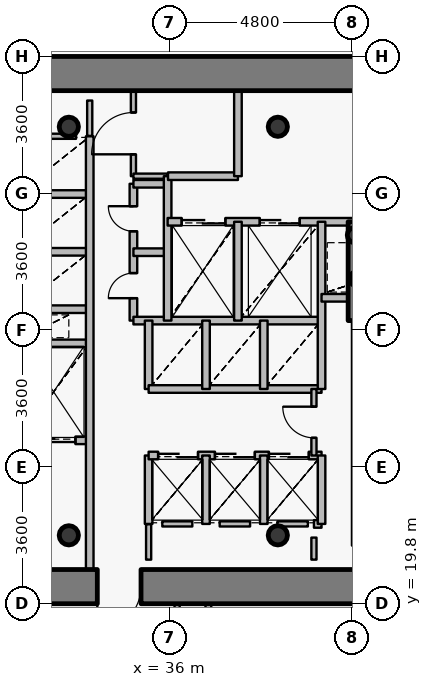
"""IFC4 building model, lengths in metres.
Left out: names, types, materials, properties, quantities, classifications, styles, units other than length and angle.
Written with IfcOpenShell. Run it as: python <this file> out.ifc"""

import sys

from ifc_helpers import new_model, si_unit, direction, frame, frame_2d, origin, origin_2d, place, context, subcontext, project, spatial, rectangle, hollow_circle, extrude, source, transform, mapped, element, fill, save


model = new_model("IFC4")
c1 = context("Model", 3, precision=1e-05, world=origin(), true_north=direction((0.0, 1.0)))
c2 = subcontext(c1, "Body", "Model", "MODEL_VIEW")
j1 = project(units=[si_unit("LENGTHUNIT", "METRE"), si_unit("PLANEANGLEUNIT", "RADIAN")], contexts=[c1])
p1 = place(None, origin())
s1 = spatial("IfcSite", under=j1, at=p1, CompositionType="ELEMENT")
p2 = place(p1, origin())
s2 = spatial("IfcBuilding", under=s1, at=p2, CompositionType="ELEMENT")
p3 = place(p2, frame((0.0, 0.0, 40.8)))
s3 = spatial("IfcBuildingStorey", under=s2, at=p3, CompositionType="ELEMENT", Elevation=40.8)
for number, where, z_axis, x_axis in (
    (1, (33.35, 21.6, 0.0), (0.0, 0.0, 1.0), (1.0, 0.0, 0.0)),
    (2, (38.85, 21.6, 0.0), (0.0, 0.0, 1.0), (1.0, 0.0, 0.0)),
    (3, (38.85, 32.35, 0.0), (0.0, 0.0, 1.0), (1.0, 0.0, 0.0)),
    (4, (33.35, 32.35, 0.0), (0.0, 0.0, 1.0), (1.0, 0.0, 0.0)),
):
    element("IfcColumn", number, at=place(p3, frame(where, z_axis=z_axis, x_axis=x_axis)), inside=s3, PredefinedType="COLUMN", context=c2, shape_type="SweptSolid", body=[
        extrude(hollow_circle(Radius=0.254, WallThickness=0.02, at=origin_2d()), origin(), (0.0, 0.0, 1.0), 4.2),
    ])
for number, where, z_axis, x_axis in (
    (5, (40.95, 28.35, 0.0), (0.0, 0.0, 1.0), (1.0, 0.0, 0.0)),
    (6, (40.88, 29.5, 0.0), (0.0, 0.0, 1.0), (1.0, 0.0, 0.0)),
):
    element("IfcColumn", number, at=place(p3, frame(where, z_axis=z_axis, x_axis=x_axis)), inside=s3, PredefinedType="COLUMN", context=c2, shape_type="SweptSolid", body=[
        extrude(hollow_circle(Radius=0.203, WallThickness=0.016, at=origin_2d()), origin(), (0.0, 0.0, 1.0), 4.2),
    ])
p4 = place(p3, frame((26.75, 33.75, 0.0), z_axis=(0.0, 0.0, 1.0), x_axis=(1.0, 0.0, 0.0)))
e7 = element("IfcWall", 7, at=p4, inside=s3, PredefinedType="SHEAR", context=c2, shape_type="SweptSolid", body=[
    extrude(rectangle(XDim=18.5, YDim=0.9, at=frame_2d((9.25, 0.0))), origin(), (0.0, 0.0, 1.0), 3.4),
])
p5 = place(p3, frame((45.25, 20.25, 0.0), z_axis=(0.0, 0.0, 1.0), x_axis=(-1.0, 0.0, 0.0)))
e8 = element("IfcWall", 8, at=p5, inside=s3, PredefinedType="SHEAR", context=c2, shape_type="SweptSolid", body=[
    extrude(rectangle(XDim=18.5, YDim=0.9, at=frame_2d((9.25, 0.0))), origin(), (0.0, 0.0, 1.0), 3.4),
])
p6 = place(p5, frame((10.0, 0.0, 0.0)))
e9 = element("IfcOpeningElement", 9, at=p6, cuts=e8, PredefinedType="OPENING", context=c2, shape_type="SweptSolid", body=[
    extrude(rectangle(XDim=1.15, YDim=2.15, at=origin_2d()), frame((0.575, 0.46, 1.075), z_axis=(0.0, -1.0, 0.0), x_axis=(1.0, 0.0, 0.0)), (0.0, 0.0, 1.0), 0.92),
])
p7 = place(p3, frame((40.9, 27.25, 0.0), z_axis=(0.0, 0.0, 1.0), x_axis=(0.0, 1.0, 0.0)))
e10 = element("IfcWall", 10, at=p7, inside=s3, PredefinedType="SHEAR", context=c2, shape_type="SweptSolid", body=[
    extrude(rectangle(XDim=2.6, YDim=0.4, at=frame_2d((1.3, 0.0))), origin(), (0.0, 0.0, 1.0), 3.55),
])
p8 = place(p3, frame((32.0, 24.1, 0.0), z_axis=(0.0, 0.0, 1.0), x_axis=(1.0, 0.0, 0.0)))
e11 = element("IfcWall", 11, at=p8, inside=s3, PredefinedType="PARTITIONING", context=c2, shape_type="SweptSolid", body=[
    extrude(rectangle(XDim=1.9, YDim=0.2, at=frame_2d((0.95, 0.0))), origin(), (0.0, 0.0, 1.0), 3.535),
])
p9 = place(p8, frame((0.375, 0.0, 0.0)))
e12 = element("IfcOpeningElement", 12, at=p9, cuts=e11, PredefinedType="OPENING", context=c2, shape_type="SweptSolid", body=[
    extrude(rectangle(XDim=1.15, YDim=2.15, at=origin_2d()), frame((0.575, 0.11, 1.075), z_axis=(0.0, -1.0, 0.0), x_axis=(1.0, 0.0, 0.0)), (0.0, 0.0, 1.0), 0.22),
])
for number, where, z_axis, x_axis in (
    (13, (32.0, 26.65, 0.0), (0.0, 0.0, 1.0), (1.0, 0.0, 0.0)),
    (14, (32.0, 27.55, 0.0), (0.0, 0.0, 1.0), (1.0, 0.0, 0.0)),
    (15, (32.0, 29.06, 0.0), (0.0, 0.0, 1.0), (1.0, 0.0, 0.0)),
    (16, (32.0, 30.58, 0.0), (0.0, 0.0, 1.0), (1.0, 0.0, 0.0)),
):
    element("IfcWall", number, at=place(p3, frame(where, z_axis=z_axis, x_axis=x_axis)), inside=s3, PredefinedType="PARTITIONING", context=c2, shape_type="SweptSolid", body=[
        extrude(rectangle(XDim=1.9, YDim=0.2, at=frame_2d((0.95, 0.0))), origin(), (0.0, 0.0, 1.0), 3.535),
    ])
p10 = place(p3, frame((33.9, 20.7, 0.0), z_axis=(0.0, 0.0, 1.0), x_axis=(0.0, 1.0, 0.0)))
e17 = element("IfcWall", 17, at=p10, inside=s3, PredefinedType="PARTITIONING", context=c2, shape_type="SweptSolid", body=[
    extrude(rectangle(XDim=11.4, YDim=0.2, at=frame_2d((5.7, 0.0))), origin(), (0.0, 0.0, 1.0), 3.535),
])
p11 = place(p3, frame((35.05, 27.25, 0.0), z_axis=(0.0, 0.0, 1.0), x_axis=(0.0, 1.0, 0.0)))
e18 = element("IfcWall", 18, at=p11, inside=s3, PredefinedType="PARTITIONING", context=c2, shape_type="SweptSolid", body=[
    extrude(rectangle(XDim=3.6, YDim=0.2, at=frame_2d((1.8, 0.0))), origin(), (0.0, 0.0, 1.0), 3.95),
])
p12 = place(p11, frame((0.59, 0.0, 0.0)))
e19 = element("IfcOpeningElement", 19, at=p12, cuts=e18, PredefinedType="OPENING", context=c2, shape_type="SweptSolid", body=[
    extrude(rectangle(XDim=0.66, YDim=2.05, at=origin_2d()), frame((0.33, 0.11, 1.025), z_axis=(0.0, -1.0, 0.0), x_axis=(1.0, 0.0, 0.0)), (0.0, 0.0, 1.0), 0.22),
])
p13 = place(p11, frame((2.35, 0.0, 0.0)))
e20 = element("IfcOpeningElement", 20, at=p13, cuts=e18, PredefinedType="OPENING", context=c2, shape_type="SweptSolid", body=[
    extrude(rectangle(XDim=0.66, YDim=2.05, at=origin_2d()), frame((0.33, 0.11, 1.025), z_axis=(0.0, -1.0, 0.0), x_axis=(1.0, 0.0, 0.0)), (0.0, 0.0, 1.0), 0.22),
])
p14 = place(p3, frame((35.05, 27.25, 0.0), z_axis=(0.0, 0.0, 1.0), x_axis=(1.0, 0.0, 0.0)))
e21 = element("IfcWall", 21, at=p14, inside=s3, PredefinedType="PARTITIONING", context=c2, shape_type="SweptSolid", body=[
    extrude(rectangle(XDim=4.95, YDim=0.2, at=frame_2d((2.475, 0.0))), origin(), (0.0, 0.0, 1.0), 3.535),
])
for number, where, z_axis, x_axis in (
    (22, (35.05, 29.05, 0.0), (0.0, 0.0, 1.0), (1.0, 0.0, 0.0)),
    (23, (35.05, 30.85, 0.0), (0.0, 0.0, 1.0), (1.0, 0.0, 0.0)),
):
    element("IfcWall", number, at=place(p3, frame(where, z_axis=z_axis, x_axis=x_axis)), inside=s3, PredefinedType="PARTITIONING", context=c2, shape_type="SweptSolid", body=[
        extrude(rectangle(XDim=0.9, YDim=0.2, at=frame_2d((0.45, 0.0))), origin(), (0.0, 0.0, 1.0), 3.95),
    ])
p15 = place(p3, frame((35.05, 31.05, 0.0), z_axis=(0.0, 0.0, 1.0), x_axis=(0.0, 1.0, 0.0)))
e24 = element("IfcWall", 24, at=p15, inside=s3, PredefinedType="PARTITIONING", context=c2, shape_type="SweptSolid", body=[
    extrude(rectangle(XDim=2.25, YDim=0.135, at=frame_2d((1.125, 0.0))), origin(), (0.0, 0.0, 1.0), 3.535),
])
p16 = place(p15, frame((0.575, 0.0, 0.0)))
e25 = element("IfcOpeningElement", 25, at=p16, cuts=e24, PredefinedType="OPENING", context=c2, shape_type="SweptSolid", body=[
    extrude(rectangle(XDim=1.1, YDim=2.15, at=origin_2d()), frame((0.55, 0.078, 1.075), z_axis=(0.0, -1.0, 0.0), x_axis=(1.0, 0.0, 0.0)), (0.0, 0.0, 1.0), 0.155),
])
p17 = place(p3, frame((35.05, 31.05, 0.0), z_axis=(0.0, 0.0, 1.0), x_axis=(1.0, 0.0, 0.0)))
e26 = element("IfcWall", 26, at=p17, inside=s3, PredefinedType="PARTITIONING", context=c2, shape_type="SweptSolid", body=[
    extrude(rectangle(XDim=0.9, YDim=0.135, at=frame_2d((0.45, 0.0))), origin(), (0.0, 0.0, 1.0), 3.95),
])
p18 = place(p3, frame((35.45, 21.9, 0.0), z_axis=(0.0, 0.0, 1.0), x_axis=(0.0, 1.0, 0.0)))
e27 = element("IfcWall", 27, at=p18, inside=s3, PredefinedType="PARTITIONING", context=c2, shape_type="SweptSolid", body=[
    extrude(rectangle(XDim=1.8, YDim=0.2, at=frame_2d((0.9, 0.0))), origin(), (0.0, 0.0, 1.0), 3.95),
])
p19 = place(p3, frame((35.45, 23.7, 0.0), z_axis=(0.0, 0.0, 1.0), x_axis=(1.0, 0.0, 0.0)))
e28 = element("IfcWall", 28, at=p19, inside=s3, PredefinedType="PARTITIONING", context=c2, shape_type="SweptSolid", body=[
    extrude(rectangle(XDim=4.55, YDim=0.2, at=frame_2d((2.275, 0.0))), origin(), (0.0, 0.0, 1.0), 3.535),
])
p20 = place(p19, frame((0.25, 0.0, 0.0)))
e29 = element("IfcOpeningElement", 29, at=p20, cuts=e28, PredefinedType="OPENING", context=c2, shape_type="SweptSolid", body=[
    extrude(rectangle(XDim=1.05, YDim=2.15, at=origin_2d()), frame((0.525, 0.11, 1.075), z_axis=(0.0, -1.0, 0.0), x_axis=(1.0, 0.0, 0.0)), (0.0, 0.0, 1.0), 0.22),
])
p21 = place(p19, frame((1.745, 0.0, 0.0)))
e30 = element("IfcOpeningElement", 30, at=p21, cuts=e28, PredefinedType="OPENING", context=c2, shape_type="SweptSolid", body=[
    extrude(rectangle(XDim=1.05, YDim=2.15, at=origin_2d()), frame((0.525, 0.11, 1.075), z_axis=(0.0, -1.0, 0.0), x_axis=(1.0, 0.0, 0.0)), (0.0, 0.0, 1.0), 0.22),
])
p22 = place(p19, frame((3.165, 0.0, 0.0)))
e31 = element("IfcOpeningElement", 31, at=p22, cuts=e28, PredefinedType="OPENING", context=c2, shape_type="SweptSolid", body=[
    extrude(rectangle(XDim=1.05, YDim=2.15, at=origin_2d()), frame((0.525, 0.11, 1.075), z_axis=(0.0, -1.0, 0.0), x_axis=(1.0, 0.0, 0.0)), (0.0, 0.0, 1.0), 0.22),
])
p23 = place(p3, frame((35.45, 25.45, 0.0), z_axis=(0.0, 0.0, 1.0), x_axis=(0.0, 1.0, 0.0)))
e32 = element("IfcWall", 32, at=p23, inside=s3, PredefinedType="PARTITIONING", context=c2, shape_type="SweptSolid", body=[
    extrude(rectangle(XDim=1.8, YDim=0.2, at=frame_2d((0.9, 0.0))), origin(), (0.0, 0.0, 1.0), 3.95),
])
p24 = place(p3, frame((35.45, 25.45, 0.0), z_axis=(0.0, 0.0, 1.0), x_axis=(1.0, 0.0, 0.0)))
e33 = element("IfcWall", 33, at=p24, inside=s3, PredefinedType="PARTITIONING", context=c2, shape_type="SweptSolid", body=[
    extrude(rectangle(XDim=4.55, YDim=0.2, at=frame_2d((2.275, 0.0))), origin(), (0.0, 0.0, 1.0), 3.535),
])
p25 = place(p3, frame((35.95, 27.25, 0.0), z_axis=(0.0, 0.0, 1.0), x_axis=(0.0, 1.0, 0.0)))
e34 = element("IfcWall", 34, at=p25, inside=s3, PredefinedType="PARTITIONING", context=c2, shape_type="SweptSolid", body=[
    extrude(rectangle(XDim=3.8, YDim=0.2, at=frame_2d((1.9, 0.0))), origin(), (0.0, 0.0, 1.0), 3.95),
])
p26 = place(p3, frame((35.95, 29.85, 0.0), z_axis=(0.0, 0.0, 1.0), x_axis=(1.0, 0.0, 0.0)))
e35 = element("IfcWall", 35, at=p26, inside=s3, PredefinedType="PARTITIONING", context=c2, shape_type="SweptSolid", body=[
    extrude(rectangle(XDim=8.49, YDim=0.2, at=frame_2d((4.245, 0.0))), origin(), (0.0, 0.0, 1.0), 3.535),
])
p27 = place(p26, frame((6.1, 0.0, 0.0)))
e36 = element("IfcOpeningElement", 36, at=p27, cuts=e35, PredefinedType="OPENING", context=c2, shape_type="SweptSolid", body=[
    extrude(rectangle(XDim=1.2, YDim=2.15, at=origin_2d()), frame((0.6, 0.11, 1.075), z_axis=(0.0, -1.0, 0.0), x_axis=(1.0, 0.0, 0.0)), (0.0, 0.0, 1.0), 0.22),
])
p28 = place(p26, frame((0.37, 0.0, 0.0)))
e37 = element("IfcOpeningElement", 37, at=p28, cuts=e35, PredefinedType="OPENING", context=c2, shape_type="SweptSolid", body=[
    extrude(rectangle(XDim=1.15, YDim=2.15, at=origin_2d()), frame((0.575, 0.11, 1.075), z_axis=(0.0, -1.0, 0.0), x_axis=(1.0, 0.0, 0.0)), (0.0, 0.0, 1.0), 0.22),
])
p29 = place(p26, frame((2.425, 0.0, 0.0)))
e38 = element("IfcOpeningElement", 38, at=p29, cuts=e35, PredefinedType="OPENING", context=c2, shape_type="SweptSolid", body=[
    extrude(rectangle(XDim=1.05, YDim=2.15, at=origin_2d()), frame((0.525, 0.11, 1.075), z_axis=(0.0, -1.0, 0.0), x_axis=(1.0, 0.0, 0.0)), (0.0, 0.0, 1.0), 0.22),
])
p30 = place(p3, frame((35.96, 31.05, 0.0), z_axis=(0.0, 0.0, 1.0), x_axis=(1.0, 0.0, 0.0)))
e39 = element("IfcWall", 39, at=p30, inside=s3, PredefinedType="PARTITIONING", context=c2, shape_type="SweptSolid", body=[
    extrude(rectangle(XDim=1.84, YDim=0.2, at=frame_2d((0.92, 0.0))), origin(), (0.0, 0.0, 1.0), 3.95),
])
p31 = place(p3, frame((36.2, 17.9, 0.0), z_axis=(0.0, 0.0, 1.0), x_axis=(0.0, 1.0, 0.0)))
e40 = element("IfcWall", 40, at=p31, inside=s3, PredefinedType="PARTITIONING", context=c2, shape_type="SweptSolid", body=[
    extrude(rectangle(XDim=1.9, YDim=0.135, at=frame_2d((0.95, 0.0))), origin(), (0.0, 0.0, 1.0), 3.285),
])
for number, where, z_axis, x_axis in (
    (41, (36.96, 21.9, 0.0), (0.0, 0.0, 1.0), (0.0, 1.0, 0.0)),
    (42, (36.96, 25.45, 0.0), (0.0, 0.0, 1.0), (0.0, 1.0, 0.0)),
):
    element("IfcWall", number, at=place(p3, frame(where, z_axis=z_axis, x_axis=x_axis)), inside=s3, PredefinedType="PARTITIONING", context=c2, shape_type="SweptSolid", body=[
        extrude(rectangle(XDim=1.8, YDim=0.2, at=frame_2d((0.9, 0.0))), origin(), (0.0, 0.0, 1.0), 3.95),
    ])
p32 = place(p3, frame((37.012, 19.8, 0.0), z_axis=(0.0, 0.0, 1.0), x_axis=(0.139168038406, -0.990268780224, 0.0)))
e43 = element("IfcWall", 43, at=p32, inside=s3, PredefinedType="PARTITIONING", context=c2, shape_type="SweptSolid", body=[
    extrude(rectangle(XDim=17.067, YDim=0.15, at=frame_2d((8.534, 0.0))), origin(), (0.0, 0.0, 1.0), 3.335),
])
p33 = place(p3, frame((37.8, 27.25, 0.0), z_axis=(0.0, 0.0, 1.0), x_axis=(0.0, 1.0, 0.0)))
e44 = element("IfcWall", 44, at=p33, inside=s3, PredefinedType="PARTITIONING", context=c2, shape_type="SweptSolid", body=[
    extrude(rectangle(XDim=2.6, YDim=0.2, at=frame_2d((1.3, 0.0))), origin(), (0.0, 0.0, 1.0), 3.95),
])
p34 = place(p3, frame((37.8, 31.05, 0.0), z_axis=(0.0, 0.0, 1.0), x_axis=(0.0, 1.0, 0.0)))
e45 = element("IfcWall", 45, at=p34, inside=s3, PredefinedType="PARTITIONING", context=c2, shape_type="SweptSolid", body=[
    extrude(rectangle(XDim=2.25, YDim=0.2, at=frame_2d((1.125, 0.0))), origin(), (0.0, 0.0, 1.0), 3.535),
])
for number, where, z_axis, x_axis in (
    (46, (38.48, 21.9, 0.0), (0.0, 0.0, 1.0), (0.0, 1.0, 0.0)),
    (47, (38.48, 25.45, 0.0), (0.0, 0.0, 1.0), (0.0, 1.0, 0.0)),
):
    element("IfcWall", number, at=place(p3, frame(where, z_axis=z_axis, x_axis=x_axis)), inside=s3, PredefinedType="PARTITIONING", context=c2, shape_type="SweptSolid", body=[
        extrude(rectangle(XDim=1.8, YDim=0.2, at=frame_2d((0.9, 0.0))), origin(), (0.0, 0.0, 1.0), 3.95),
    ])
p35 = place(p3, frame((39.8, 21.9, 0.0), z_axis=(0.0, 0.0, 1.0), x_axis=(1.0, 0.0, 0.0)))
e48 = element("IfcWall", 48, at=p35, inside=s3, PredefinedType="PARTITIONING", context=c2, shape_type="SweptSolid", body=[
    extrude(rectangle(XDim=0.2, YDim=0.2, at=frame_2d((0.1, 0.0))), origin(), (0.0, 0.0, 1.0), 3.95),
])
p36 = place(p3, frame((39.8, 23.7, 0.0), z_axis=(0.0, 0.0, 1.0), x_axis=(0.0, 1.0, 0.0)))
e49 = element("IfcWall", 49, at=p36, inside=s3, PredefinedType="PARTITIONING", context=c2, shape_type="SweptSolid", body=[
    extrude(rectangle(XDim=1.75, YDim=0.135, at=frame_2d((0.875, 0.0))), origin(), (0.0, 0.0, 1.0), 3.95),
])
p37 = place(p36, frame((0.465, 0.0, 0.0)))
e50 = element("IfcOpeningElement", 50, at=p37, cuts=e49, PredefinedType="OPENING", context=c2, shape_type="SweptSolid", body=[
    extrude(rectangle(XDim=0.82, YDim=2.1, at=origin_2d()), frame((0.41, 0.078, 1.05), z_axis=(0.0, -1.0, 0.0), x_axis=(1.0, 0.0, 0.0)), (0.0, 0.0, 1.0), 0.155),
])
p38 = place(p3, frame((40.0, 21.9, 0.0), z_axis=(0.0, 0.0, 1.0), x_axis=(0.0, 1.0, 0.0)))
e51 = element("IfcWall", 51, at=p38, inside=s3, PredefinedType="PARTITIONING", context=c2, shape_type="SweptSolid", body=[
    extrude(rectangle(XDim=1.8, YDim=0.2, at=frame_2d((0.9, 0.0))), origin(), (0.0, 0.0, 1.0), 3.95),
])
p39 = place(p3, frame((40.0, 25.45, 0.0), z_axis=(0.0, 0.0, 1.0), x_axis=(0.0, 1.0, 0.0)))
e52 = element("IfcWall", 52, at=p39, inside=s3, PredefinedType="PARTITIONING", context=c2, shape_type="SweptSolid", body=[
    extrude(rectangle(XDim=4.4, YDim=0.2, at=frame_2d((2.2, 0.0))), origin(), (0.0, 0.0, 1.0), 3.95),
])
p40 = place(p3, frame((40.0, 27.85, 0.0), z_axis=(0.0, 0.0, 1.0), x_axis=(1.0, 0.0, 0.0)))
e53 = element("IfcWall", 53, at=p40, inside=s3, PredefinedType="PARTITIONING", context=c2, shape_type="SweptSolid", body=[
    extrude(rectangle(XDim=0.9, YDim=0.2, at=frame_2d((0.45, 0.0))), origin(), (0.0, 0.0, 1.0), 3.95),
])
p41 = place(p3, frame((40.9, 21.33, 0.0), z_axis=(0.0, 0.0, 1.0), x_axis=(0.0, 1.0, 0.0)))
e54 = element("IfcWall", 54, at=p41, inside=s3, PredefinedType="PARTITIONING", context=c2, shape_type="SweptSolid", body=[
    extrude(rectangle(XDim=5.91, YDim=0.2, at=frame_2d((2.955, 0.0))), origin(), (0.0, 0.0, 1.0), 3.485),
])
p42 = place(p3, frame((36.6, 21.9, 0.0), z_axis=(0.0, 0.0, 1.0), x_axis=(-1.0, 0.0, 0.0)))
e55 = element("IfcWall", 55, at=p42, inside=s3, PredefinedType="PARTITIONING", context=c2, shape_type="SweptSolid", body=[
    extrude(rectangle(XDim=0.79, YDim=0.135, at=frame_2d((0.395, 0.0))), origin(), (0.0, 0.0, 1.0), 3.95),
])
p43 = place(p3, frame((38.12, 21.9, 0.0), z_axis=(0.0, 0.0, 1.0), x_axis=(-1.0, 0.0, 0.0)))
e56 = element("IfcWall", 56, at=p43, inside=s3, PredefinedType="PARTITIONING", context=c2, shape_type="SweptSolid", body=[
    extrude(rectangle(XDim=0.8, YDim=0.135, at=frame_2d((0.4, 0.0))), origin(), (0.0, 0.0, 1.0), 3.95),
])
p44 = place(p3, frame((39.64, 21.9, 0.0), z_axis=(0.0, 0.0, 1.0), x_axis=(-1.0, 0.0, 0.0)))
e57 = element("IfcWall", 57, at=p44, inside=s3, PredefinedType="PARTITIONING", context=c2, shape_type="SweptSolid", body=[
    extrude(rectangle(XDim=0.8, YDim=0.135, at=frame_2d((0.4, 0.0))), origin(), (0.0, 0.0, 1.0), 3.535),
])
p45 = place(p3, frame((32.36, 32.1, 0.0), z_axis=(0.0, 0.0, 1.0), x_axis=(1.0, 0.0, 0.0)))
e58 = element("IfcWall", 58, at=p45, inside=s3, PredefinedType="PARTITIONING", context=c2, shape_type="SweptSolid", body=[
    extrude(rectangle(XDim=1.18, YDim=0.135, at=frame_2d((0.59, 0.0))), origin(), (0.0, 0.0, 1.0), 3.535),
])
p46 = place(p3, frame((39.8, 20.96, 0.0), z_axis=(0.0, 0.0, 1.0), x_axis=(0.0, 1.0, 0.0)))
e59 = element("IfcWall", 59, at=p46, inside=s3, PredefinedType="PARTITIONING", context=c2, shape_type="SweptSolid", body=[
    extrude(rectangle(XDim=0.58, YDim=0.135, at=frame_2d((0.29, 0.0))), origin(), (0.0, 0.0, 1.0), 3.485),
])
for number, where, z_axis, x_axis in (
    (60, (35.45, 21.89, 0.0), (0.0, 0.0, 1.0), (0.0, -1.0, 0.0)),
    (61, (33.9, 32.11, 0.0), (0.0, 0.0, 1.0), (0.0, 1.0, 0.0)),
):
    element("IfcWall", number, at=place(p3, frame(where, z_axis=z_axis, x_axis=x_axis)), inside=s3, PredefinedType="PARTITIONING", context=c2, shape_type="SweptSolid", body=[
        extrude(rectangle(XDim=0.93, YDim=0.135, at=frame_2d((0.465, 0.0))), origin(), (0.0, 0.0, 1.0), 3.535),
    ])
m1 = source(origin(), c2, "Body", "SweptSolid", [
    extrude(rectangle(XDim=1.15, YDim=2.15, at=origin_2d()), frame((0.575, 0.025, 1.075), z_axis=(0.0, -1.0, 0.0), x_axis=(1.0, 0.0, 0.0)), (0.0, 0.0, 1.0), 0.05),
])
p47 = place(p6, origin())
e62 = element("IfcDoor", 62, at=p47, inside=s3, OperationType="SINGLE_SWING_RIGHT", PredefinedType="DOOR", context=c2, shape_type="MappedRepresentation", body=[
    mapped(m1, transform((0.0, 0.0, 0.0), x_axis=(1.0, 0.0, 0.0), y_axis=(0.0, 1.0, 0.0), z_axis=(0.0, 0.0, 1.0), scale=1.0)),
])
fill(e9, e62)
m2 = source(origin(), c2, "Body", "SweptSolid", [
    extrude(rectangle(XDim=1.15, YDim=2.15, at=origin_2d()), frame((0.575, 0.025, 1.075), z_axis=(0.0, -1.0, 0.0), x_axis=(1.0, 0.0, 0.0)), (0.0, 0.0, 1.0), 0.05),
])
p48 = place(p28, origin())
e63 = element("IfcDoor", 63, at=p48, inside=s3, OperationType="DOUBLE_DOOR_SLIDING", PredefinedType="USERDEFINED", context=c2, shape_type="MappedRepresentation", body=[
    mapped(m2, transform((0.0, 0.0, 0.0), x_axis=(1.0, 0.0, 0.0), y_axis=(0.0, 1.0, 0.0), z_axis=(0.0, 0.0, 1.0), scale=1.0)),
])
fill(e37, e63)
p49 = place(p9, origin())
e64 = element("IfcDoor", 64, at=p49, inside=s3, OperationType="DOUBLE_DOOR_SLIDING", PredefinedType="USERDEFINED", context=c2, shape_type="MappedRepresentation", body=[
    mapped(m2, transform((0.0, 0.0, 0.0), x_axis=(1.0, 0.0, 0.0), y_axis=(0.0, 1.0, 0.0), z_axis=(0.0, 0.0, 1.0), scale=1.0)),
])
fill(e12, e64)
m3 = source(origin(), c2, "Body", "SweptSolid", [
    extrude(rectangle(XDim=1.05, YDim=2.15, at=origin_2d()), frame((0.525, 0.025, 1.075), z_axis=(0.0, -1.0, 0.0), x_axis=(1.0, 0.0, 0.0)), (0.0, 0.0, 1.0), 0.05),
])
p50 = place(p29, origin())
e65 = element("IfcDoor", 65, at=p50, inside=s3, OperationType="DOUBLE_DOOR_SLIDING", PredefinedType="USERDEFINED", context=c2, shape_type="MappedRepresentation", body=[
    mapped(m3, transform((0.0, 0.0, 0.0), x_axis=(1.0, 0.0, 0.0), y_axis=(0.0, 1.0, 0.0), z_axis=(0.0, 0.0, 1.0), scale=1.0)),
])
fill(e38, e65)
p51 = place(p20, origin())
e66 = element("IfcDoor", 66, at=p51, inside=s3, OperationType="DOUBLE_DOOR_SLIDING", PredefinedType="USERDEFINED", context=c2, shape_type="MappedRepresentation", body=[
    mapped(m3, transform((0.0, 0.0, 0.0), x_axis=(1.0, 0.0, 0.0), y_axis=(0.0, 1.0, 0.0), z_axis=(0.0, 0.0, 1.0), scale=1.0)),
])
fill(e29, e66)
p52 = place(p21, origin())
e67 = element("IfcDoor", 67, at=p52, inside=s3, OperationType="DOUBLE_DOOR_SLIDING", PredefinedType="USERDEFINED", context=c2, shape_type="MappedRepresentation", body=[
    mapped(m3, transform((0.0, 0.0, 0.0), x_axis=(1.0, 0.0, 0.0), y_axis=(0.0, 1.0, 0.0), z_axis=(0.0, 0.0, 1.0), scale=1.0)),
])
fill(e30, e67)
p53 = place(p22, origin())
e68 = element("IfcDoor", 68, at=p53, inside=s3, OperationType="DOUBLE_DOOR_SLIDING", PredefinedType="USERDEFINED", context=c2, shape_type="MappedRepresentation", body=[
    mapped(m3, transform((0.0, 0.0, 0.0), x_axis=(1.0, 0.0, 0.0), y_axis=(0.0, 1.0, 0.0), z_axis=(0.0, 0.0, 1.0), scale=1.0)),
])
fill(e31, e68)
m4 = source(origin(), c2, "Body", "SweptSolid", [
    extrude(rectangle(XDim=0.66, YDim=2.05, at=origin_2d()), frame((0.33, 0.025, 1.025), z_axis=(0.0, -1.0, 0.0), x_axis=(1.0, 0.0, 0.0)), (0.0, 0.0, 1.0), 0.05),
])
p54 = place(p12, origin())
e69 = element("IfcDoor", 69, at=p54, inside=s3, OperationType="SINGLE_SWING_LEFT", PredefinedType="USERDEFINED", context=c2, shape_type="MappedRepresentation", body=[
    mapped(m4, transform((0.0, 0.0, 0.0), x_axis=(1.0, 0.0, 0.0), y_axis=(0.0, 1.0, 0.0), z_axis=(0.0, 0.0, 1.0), scale=1.0)),
])
fill(e19, e69)
p55 = place(p13, origin())
e70 = element("IfcDoor", 70, at=p55, inside=s3, OperationType="SINGLE_SWING_RIGHT", PredefinedType="USERDEFINED", context=c2, shape_type="MappedRepresentation", body=[
    mapped(m4, transform((0.0, 0.0, 0.0), x_axis=(1.0, 0.0, 0.0), y_axis=(0.0, 1.0, 0.0), z_axis=(0.0, 0.0, 1.0), scale=1.0)),
])
fill(e20, e70)
m5 = source(origin(), c2, "Body", "SweptSolid", [
    extrude(rectangle(XDim=1.1, YDim=2.15, at=origin_2d()), frame((0.55, 0.025, 1.075), z_axis=(0.0, -1.0, 0.0), x_axis=(1.0, 0.0, 0.0)), (0.0, 0.0, 1.0), 0.05),
])
p56 = place(p16, origin())
e71 = element("IfcDoor", 71, at=p56, inside=s3, OperationType="SINGLE_SWING_LEFT", PredefinedType="DOOR", context=c2, shape_type="MappedRepresentation", body=[
    mapped(m5, transform((0.0, 0.0, 0.0), x_axis=(1.0, 0.0, 0.0), y_axis=(0.0, 1.0, 0.0), z_axis=(0.0, 0.0, 1.0), scale=1.0)),
])
fill(e25, e71)
m6 = source(origin(), c2, "Body", "SweptSolid", [
    extrude(rectangle(XDim=0.82, YDim=2.1, at=origin_2d()), frame((0.41, 0.025, 1.05), z_axis=(0.0, -1.0, 0.0), x_axis=(1.0, 0.0, 0.0)), (0.0, 0.0, 1.0), 0.05),
])
p57 = place(p37, origin())
e72 = element("IfcDoor", 72, at=p57, inside=s3, OperationType="SINGLE_SWING_RIGHT", PredefinedType="DOOR", context=c2, shape_type="MappedRepresentation", body=[
    mapped(m6, transform((0.0, 0.0, 0.0), x_axis=(1.0, 0.0, 0.0), y_axis=(0.0, 1.0, 0.0), z_axis=(0.0, 0.0, 1.0), scale=1.0)),
])
fill(e50, e72)
save(model, sys.argv[1])
